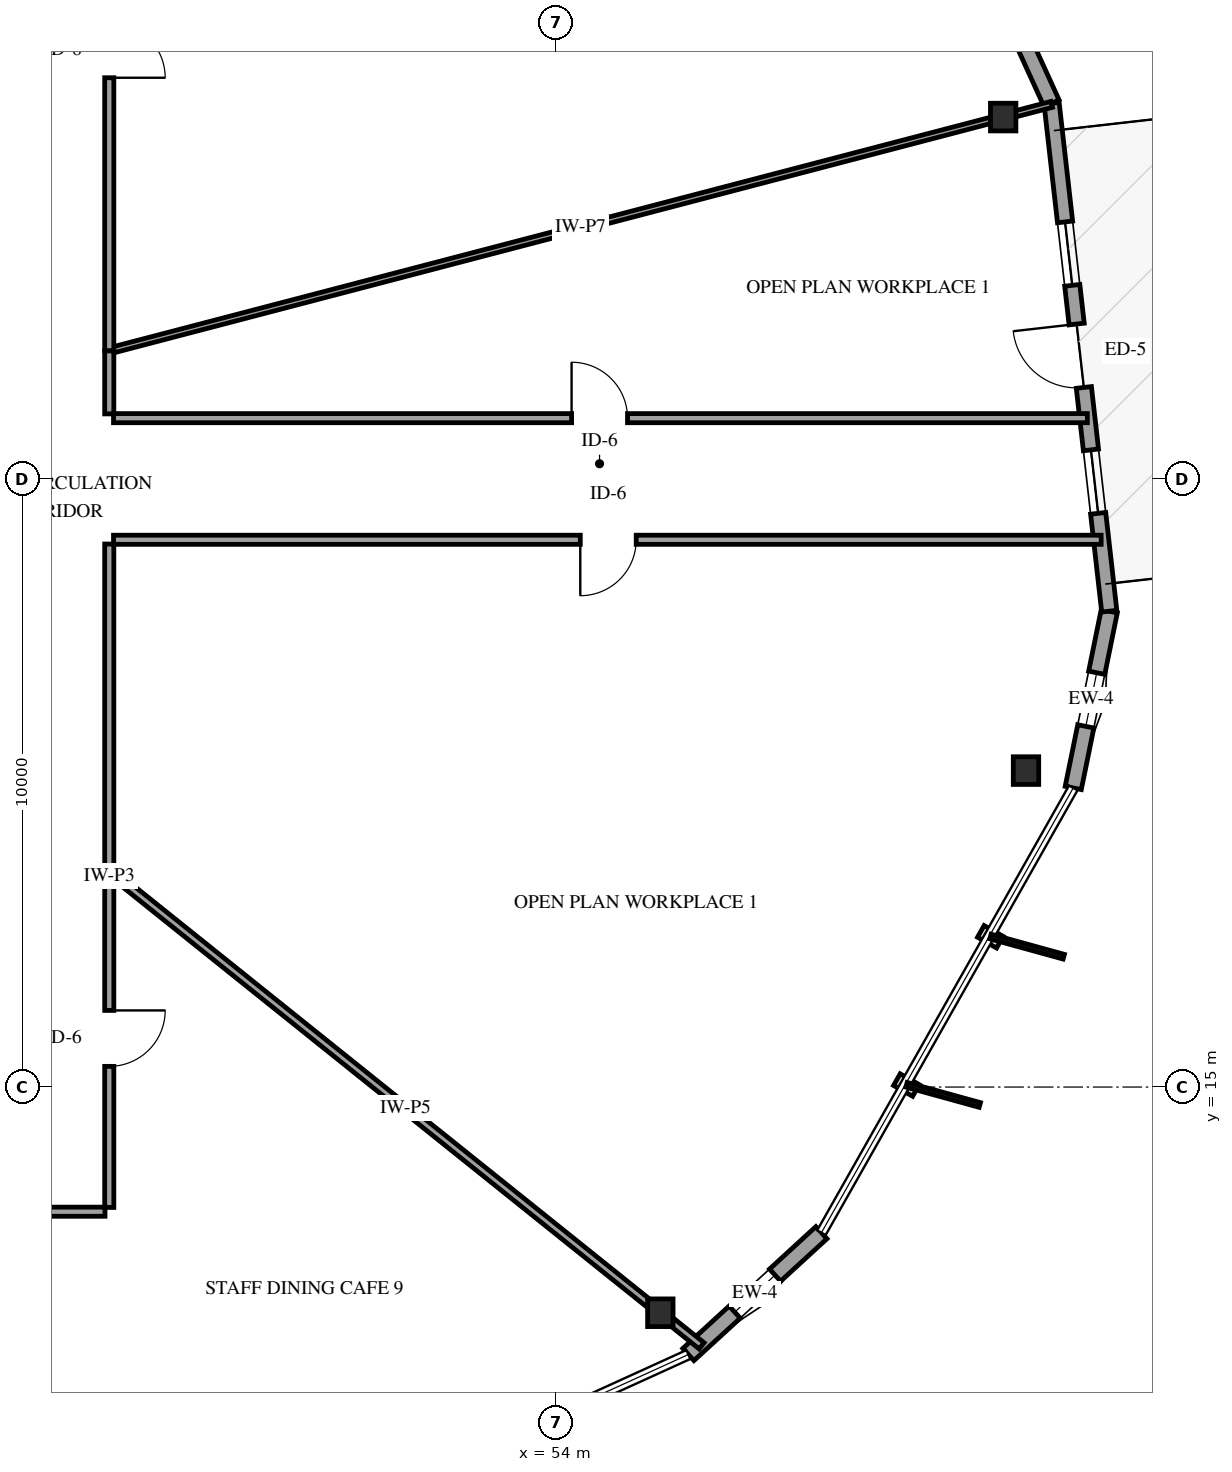
"""IFC4 building model, lengths in metres.
Left out: names, types, materials, properties, quantities, classifications, styles, units other than length and angle.
Written with IfcOpenShell. Run it as: python <this file> out.ifc"""

import sys

from ifc_helpers import new_model, si_unit, direction, frame, frame_2d, origin, origin_2d, place, context, subcontext, project, spatial, rectangle, i_section, extrude, element, fill, save


model = new_model("IFC4")
c1 = context("Model", 3, precision=1e-05, world=origin(), true_north=direction((0.0, 1.0)))
c2 = subcontext(c1, "Body", "Model", "MODEL_VIEW")
j1 = project(units=[si_unit("LENGTHUNIT", "METRE"), si_unit("PLANEANGLEUNIT", "RADIAN")], contexts=[c1])
p1 = place(None, origin())
s1 = spatial("IfcSite", under=j1, at=p1, CompositionType="ELEMENT")
p2 = place(p1, origin())
s2 = spatial("IfcBuilding", under=s1, at=p2, CompositionType="ELEMENT")
p3 = place(p2, frame((0.0, 0.0, 122.5)))
s3 = spatial("IfcBuildingStorey", under=s2, at=p3, CompositionType="ELEMENT", Elevation=122.5)
for number, where, z_axis, x_axis in (
    (1, (61.351, 30.951, 0.0), (0.0, 0.0, 1.0), (1.0, 0.0, 0.0)),
    (2, (55.712, 11.289, 0.0), (0.0, 0.0, 1.0), (1.0, 0.0, 0.0)),
    (3, (61.726, 20.204, 0.0), (0.0, 0.0, 1.0), (1.0, 0.0, 0.0)),
):
    element("IfcColumn", number, at=place(p3, frame(where, z_axis=z_axis, x_axis=x_axis)), inside=s3, PredefinedType="COLUMN", context=c2, shape_type="SweptSolid", body=[
        extrude(i_section(OverallWidth=0.418, OverallDepth=0.455, WebThickness=0.042, FlangeThickness=0.068, FilletRadius=0.038, at=origin_2d()), origin(), (0.0, 0.0, 1.0), 3.9),
    ])
p4 = place(p3, frame((56.174, 10.601, 0.0), z_axis=(0.0, 0.0, 1.0), x_axis=(0.737529789318, 0.675314600663, 0.0)))
e4 = element("IfcWall", 4, at=p4, inside=s3, PredefinedType="SOLIDWALL", context=c2, shape_type="SweptSolid", body=[
    extrude(rectangle(XDim=2.967, YDim=0.27, at=frame_2d((1.483, 0.0))), origin(), (0.0, 0.0, 1.0), 2.979),
])
p5 = place(p4, frame((1.033, 0.0, 0.75)))
e5 = element("IfcOpeningElement", 5, at=p5, cuts=e4, PredefinedType="OPENING", context=c2, shape_type="SweptSolid", body=[
    extrude(rectangle(XDim=0.9, YDim=1.5, at=frame_2d((0.45, 0.75))), frame((0.0, 0.145, 0.0), z_axis=(0.0, -1.0, 0.0), x_axis=(1.0, 0.0, 0.0)), (0.0, 0.0, 1.0), 0.29),
])
p6 = place(p3, frame((62.503, 19.919, 0.0), z_axis=(0.0, 0.0, 1.0), x_axis=(0.199723000862, 0.979852398541, 0.0)))
e6 = element("IfcWall", 6, at=p6, inside=s3, PredefinedType="SOLIDWALL", context=c2, shape_type="SweptSolid", body=[
    extrude(rectangle(XDim=2.967, YDim=0.27, at=frame_2d((1.483, 0.0))), origin(), (0.0, 0.0, 1.0), 2.979),
])
p7 = place(p6, frame((1.033, 0.0, 0.75)))
e7 = element("IfcOpeningElement", 7, at=p7, cuts=e6, PredefinedType="OPENING", context=c2, shape_type="SweptSolid", body=[
    extrude(rectangle(XDim=0.9, YDim=1.5, at=frame_2d((0.45, 0.75))), frame((0.0, 0.145, 0.0), z_axis=(0.0, -1.0, 0.0), x_axis=(1.0, 0.0, 0.0)), (0.0, 0.0, 1.0), 0.29),
])
p8 = place(p3, frame((62.147, 31.177, 0.0), z_axis=(0.0, 0.0, 1.0), x_axis=(-0.41436090181, 0.910112654044, 0.0)))
e8 = element("IfcWall", 8, at=p8, inside=s3, PredefinedType="SOLIDWALL", context=c2, shape_type="SweptSolid", body=[
    extrude(rectangle(XDim=2.967, YDim=0.27, at=frame_2d((1.483, 0.0))), origin(), (0.0, 0.0, 1.0), 2.979),
])
p9 = place(p8, frame((1.033, 0.0, 0.75)))
e9 = element("IfcOpeningElement", 9, at=p9, cuts=e8, PredefinedType="OPENING", context=c2, shape_type="SweptSolid", body=[
    extrude(rectangle(XDim=0.9, YDim=1.5, at=frame_2d((0.45, 0.75))), frame((0.0, 0.145, 0.0), z_axis=(0.0, -1.0, 0.0), x_axis=(1.0, 0.0, 0.0)), (0.0, 0.0, 1.0), 0.29),
])
p10 = place(p3, frame((63.095, 22.826, 0.0), z_axis=(0.0, 0.0, 1.0), x_axis=(-0.112873191476, 0.993609401448, 0.0)))
e10 = element("IfcWall", 10, at=p10, inside=s3, PredefinedType="SOLIDWALL", context=c2, shape_type="SweptSolid", body=[
    extrude(rectangle(XDim=8.405, YDim=0.25, at=frame_2d((4.203, 0.0))), origin(), (0.0, 0.0, 1.0), 2.979),
])
p11 = place(p10, frame((3.703, 0.0, 0.0)))
e11 = element("IfcOpeningElement", 11, at=p11, cuts=e10, PredefinedType="OPENING", context=c2, shape_type="SweptSolid", body=[
    extrude(rectangle(XDim=1.05, YDim=2.15, at=frame_2d((0.525, 1.075))), frame((0.0, 0.135, 0.0), z_axis=(0.0, -1.0, 0.0), x_axis=(1.0, 0.0, 0.0)), (0.0, 0.0, 1.0), 0.27),
])
p12 = place(p10, frame((1.619, 0.0, 0.72)))
e12 = element("IfcOpeningElement", 12, at=p12, cuts=e10, PredefinedType="OPENING", context=c2, shape_type="SweptSolid", body=[
    extrude(rectangle(XDim=1.05, YDim=1.55, at=frame_2d((0.525, 0.775))), frame((0.0, 0.135, 0.0), z_axis=(0.0, -1.0, 0.0), x_axis=(1.0, 0.0, 0.0)), (0.0, 0.0, 1.0), 0.27),
])
p13 = place(p10, frame((5.393, 0.0, 0.72)))
e13 = element("IfcOpeningElement", 13, at=p13, cuts=e10, PredefinedType="OPENING", context=c2, shape_type="SweptSolid", body=[
    extrude(rectangle(XDim=1.05, YDim=1.55, at=frame_2d((0.525, 0.775))), frame((0.0, 0.135, 0.0), z_axis=(0.0, -1.0, 0.0), x_axis=(1.0, 0.0, 0.0)), (0.0, 0.0, 1.0), 0.27),
])
p14 = place(p3, frame((62.962, 24.0, 0.0), z_axis=(0.0, 0.0, 1.0), x_axis=(-1.0, 0.0, 0.0)))
e14 = element("IfcWall", 14, at=p14, inside=s3, PredefinedType="PARTITIONING", context=c2, shape_type="SweptSolid", body=[
    extrude(rectangle(XDim=16.242, YDim=0.15, at=frame_2d((8.121, 0.0))), origin(), (0.0, 0.0, 1.0), 3.6),
])
p15 = place(p14, frame((7.646, 0.0, 0.0)))
e15 = element("IfcOpeningElement", 15, at=p15, cuts=e14, PredefinedType="OPENING", context=c2, shape_type="SweptSolid", body=[
    extrude(rectangle(XDim=0.92, YDim=2.12, at=frame_2d((0.46, 1.06))), frame((0.0, 0.085, 0.0), z_axis=(0.0, -1.0, 0.0), x_axis=(1.0, 0.0, 0.0)), (0.0, 0.0, 1.0), 0.17),
])
p16 = place(p3, frame((46.65, 27.106, 0.0), z_axis=(0.0, 0.0, 1.0), x_axis=(0.9674534554, 0.253049030101, 0.0)))
e16 = element("IfcWall", 16, at=p16, inside=s3, PredefinedType="PARTITIONING", context=c2, shape_type="SweptSolid", body=[
    extrude(rectangle(XDim=16.021, YDim=0.1, at=frame_2d((8.01, 0.0))), origin(), (0.0, 0.0, 1.0), 2.895),
])
p17 = place(p3, frame((46.72, 26.0, 0.0), z_axis=(0.0, 0.0, 1.0), x_axis=(1.0, 0.0, 0.0)))
e17 = element("IfcWall", 17, at=p17, inside=s3, PredefinedType="PARTITIONING", context=c2, shape_type="SweptSolid", body=[
    extrude(rectangle(XDim=16.015, YDim=0.15, at=frame_2d((8.008, 0.0))), origin(), (0.0, 0.0, 1.0), 3.6),
])
p18 = place(p17, frame((7.533, 0.0, 0.0)))
e18 = element("IfcOpeningElement", 18, at=p18, cuts=e17, PredefinedType="OPENING", context=c2, shape_type="SweptSolid", body=[
    extrude(rectangle(XDim=0.92, YDim=2.12, at=frame_2d((0.46, 1.06))), frame((0.0, 0.085, 0.0), z_axis=(0.0, -1.0, 0.0), x_axis=(1.0, 0.0, 0.0)), (0.0, 0.0, 1.0), 0.17),
])
p19 = place(p3, frame((46.65, 18.55, 0.0), z_axis=(0.0, 0.0, 1.0), x_axis=(0.780401084776, -0.625279255118, 0.0)))
e19 = element("IfcWall", 19, at=p19, inside=s3, PredefinedType="PARTITIONING", context=c2, shape_type="SweptSolid", body=[
    extrude(rectangle(XDim=12.482, YDim=0.13, at=frame_2d((6.241, 0.0))), origin(), (0.0, 0.0, 1.0), 3.6),
])
p20 = place(p3, frame((46.65, 36.98, 0.0), z_axis=(0.0, 0.0, 1.0), x_axis=(0.0, -1.0, 0.0)))
e20 = element("IfcWall", 20, at=p20, inside=s3, PredefinedType="PARTITIONING", context=c2, shape_type="SweptSolid", body=[
    extrude(rectangle(XDim=9.874, YDim=0.15, at=frame_2d((4.937, 0.0))), origin(), (0.0, 0.0, 1.0), 3.6),
])
p21 = place(p20, frame((4.462, 0.0, 0.0)))
e21 = element("IfcOpeningElement", 21, at=p21, cuts=e20, PredefinedType="OPENING", context=c2, shape_type="SweptSolid", body=[
    extrude(rectangle(XDim=0.92, YDim=2.12, at=frame_2d((0.46, 1.06))), frame((0.0, 0.085, 0.0), z_axis=(0.0, -1.0, 0.0), x_axis=(1.0, 0.0, 0.0)), (0.0, 0.0, 1.0), 0.17),
])
p22 = place(p3, frame((43.455, 12.95, 0.0), z_axis=(0.0, 0.0, 1.0), x_axis=(0.373820474629, -0.927501079648, 0.0)))
e22 = element("IfcWall", 22, at=p22, inside=s3, PredefinedType="PARTITIONING", context=c2, shape_type="SweptSolid", body=[
    extrude(rectangle(XDim=6.666, YDim=0.14, at=frame_2d((3.333, 0.0))), origin(), (0.0, 0.0, 1.0), 2.895),
])
p23 = place(p3, frame((46.65, 18.55, 0.0), z_axis=(0.0, 0.0, 1.0), x_axis=(0.0, -1.0, 0.0)))
e23 = element("IfcWall", 23, at=p23, inside=s3, PredefinedType="PARTITIONING", context=c2, shape_type="SweptSolid", body=[
    extrude(rectangle(XDim=5.53, YDim=0.15, at=frame_2d((2.765, 0.0))), origin(), (0.0, 0.0, 1.0), 3.6),
])
p24 = place(p23, frame((2.29, 0.0, 0.0)))
e24 = element("IfcOpeningElement", 24, at=p24, cuts=e23, PredefinedType="OPENING", context=c2, shape_type="SweptSolid", body=[
    extrude(rectangle(XDim=0.92, YDim=2.12, at=frame_2d((0.46, 1.06))), frame((0.0, 0.085, 0.0), z_axis=(0.0, -1.0, 0.0), x_axis=(1.0, 0.0, 0.0)), (0.0, 0.0, 1.0), 0.17),
])
p25 = place(p3, frame((46.65, 23.93, 0.0), z_axis=(0.0, 0.0, 1.0), x_axis=(0.0, -1.0, 0.0)))
e25 = element("IfcWall", 25, at=p25, inside=s3, PredefinedType="PARTITIONING", context=c2, shape_type="SweptSolid", body=[
    extrude(rectangle(XDim=5.38, YDim=0.15, at=frame_2d((2.69, 0.0))), origin(), (0.0, 0.0, 1.0), 3.6),
])
p26 = place(p3, frame((46.58, 12.95, 0.0), z_axis=(0.0, 0.0, 1.0), x_axis=(-1.0, 0.0, 0.0)))
e26 = element("IfcWall", 26, at=p26, inside=s3, PredefinedType="PARTITIONING", context=c2, shape_type="SweptSolid", body=[
    extrude(rectangle(XDim=3.125, YDim=0.15, at=frame_2d((1.562, 0.0))), origin(), (0.0, 0.0, 1.0), 3.6),
])
p27 = place(p3, frame((46.65, 27.106, 0.0), z_axis=(0.0, 0.0, 1.0), x_axis=(0.0, -1.0, 0.0)))
e27 = element("IfcWall", 27, at=p27, inside=s3, PredefinedType="PARTITIONING", context=c2, shape_type="SweptSolid", body=[
    extrude(rectangle(XDim=1.036, YDim=0.15, at=frame_2d((0.518, 0.0))), origin(), (0.0, 0.0, 1.0), 3.6),
])
p28 = place(p5, origin())
e28 = element("IfcWindow", 28, at=p28, inside=s3, PartitioningType="SINGLE_PANEL", PredefinedType="WINDOW", context=c2, shape_type="SweptSolid", body=[
    extrude(rectangle(XDim=0.9, YDim=1.5, at=frame_2d((0.45, 0.75))), frame((0.0, 0.03, 0.0), z_axis=(0.0, -1.0, 0.0), x_axis=(1.0, 0.0, 0.0)), (0.0, 0.0, 1.0), 0.06),
])
fill(e5, e28)
p29 = place(p7, origin())
e29 = element("IfcWindow", 29, at=p29, inside=s3, PartitioningType="SINGLE_PANEL", PredefinedType="WINDOW", context=c2, shape_type="SweptSolid", body=[
    extrude(rectangle(XDim=0.9, YDim=1.5, at=frame_2d((0.45, 0.75))), frame((0.0, 0.03, 0.0), z_axis=(0.0, -1.0, 0.0), x_axis=(1.0, 0.0, 0.0)), (0.0, 0.0, 1.0), 0.06),
])
fill(e7, e29)
p30 = place(p11, origin())
e30 = element("IfcDoor", 30, at=p30, inside=s3, OperationType="SINGLE_SWING_RIGHT", PredefinedType="DOOR", context=c2, shape_type="SweptSolid", body=[
    extrude(rectangle(XDim=1.05, YDim=2.15, at=frame_2d((0.525, 1.075))), frame((0.0, 0.025, 0.0), z_axis=(0.0, -1.0, 0.0), x_axis=(1.0, 0.0, 0.0)), (0.0, 0.0, 1.0), 0.05),
])
fill(e11, e30)
p31 = place(p12, origin())
e31 = element("IfcWindow", 31, at=p31, inside=s3, PartitioningType="SINGLE_PANEL", PredefinedType="WINDOW", context=c2, shape_type="SweptSolid", body=[
    extrude(rectangle(XDim=1.05, YDim=1.55, at=frame_2d((0.525, 0.775))), frame((0.0, 0.03, 0.0), z_axis=(0.0, -1.0, 0.0), x_axis=(1.0, 0.0, 0.0)), (0.0, 0.0, 1.0), 0.06),
])
fill(e12, e31)
p32 = place(p13, origin())
e32 = element("IfcWindow", 32, at=p32, inside=s3, PartitioningType="SINGLE_PANEL", PredefinedType="WINDOW", context=c2, shape_type="SweptSolid", body=[
    extrude(rectangle(XDim=1.05, YDim=1.55, at=frame_2d((0.525, 0.775))), frame((0.0, 0.03, 0.0), z_axis=(0.0, -1.0, 0.0), x_axis=(1.0, 0.0, 0.0)), (0.0, 0.0, 1.0), 0.06),
])
fill(e13, e32)
p33 = place(p15, origin())
e33 = element("IfcDoor", 33, at=p33, inside=s3, OperationType="SINGLE_SWING_RIGHT", PredefinedType="DOOR", context=c2, shape_type="SweptSolid", body=[
    extrude(rectangle(XDim=0.92, YDim=2.12, at=frame_2d((0.46, 1.06))), frame((0.0, 0.025, 0.0), z_axis=(0.0, -1.0, 0.0), x_axis=(1.0, 0.0, 0.0)), (0.0, 0.0, 1.0), 0.05),
])
fill(e15, e33)
p34 = place(p18, origin())
e34 = element("IfcDoor", 34, at=p34, inside=s3, OperationType="SINGLE_SWING_LEFT", PredefinedType="DOOR", context=c2, shape_type="SweptSolid", body=[
    extrude(rectangle(XDim=0.92, YDim=2.12, at=frame_2d((0.46, 1.06))), frame((0.0, 0.025, 0.0), z_axis=(0.0, -1.0, 0.0), x_axis=(1.0, 0.0, 0.0)), (0.0, 0.0, 1.0), 0.05),
])
fill(e18, e34)
p35 = place(p21, origin())
e35 = element("IfcDoor", 35, at=p35, inside=s3, OperationType="SINGLE_SWING_RIGHT", PredefinedType="DOOR", context=c2, shape_type="SweptSolid", body=[
    extrude(rectangle(XDim=0.92, YDim=2.12, at=frame_2d((0.46, 1.06))), frame((0.0, 0.025, 0.0), z_axis=(0.0, -1.0, 0.0), x_axis=(1.0, 0.0, 0.0)), (0.0, 0.0, 1.0), 0.05),
])
fill(e21, e35)
p36 = place(p24, origin())
e36 = element("IfcDoor", 36, at=p36, inside=s3, OperationType="SINGLE_SWING_LEFT", PredefinedType="DOOR", context=c2, shape_type="SweptSolid", body=[
    extrude(rectangle(XDim=0.92, YDim=2.12, at=frame_2d((0.46, 1.06))), frame((0.0, 0.025, 0.0), z_axis=(0.0, -1.0, 0.0), x_axis=(1.0, 0.0, 0.0)), (0.0, 0.0, 1.0), 0.05),
])
fill(e24, e36)
save(model, sys.argv[1])
